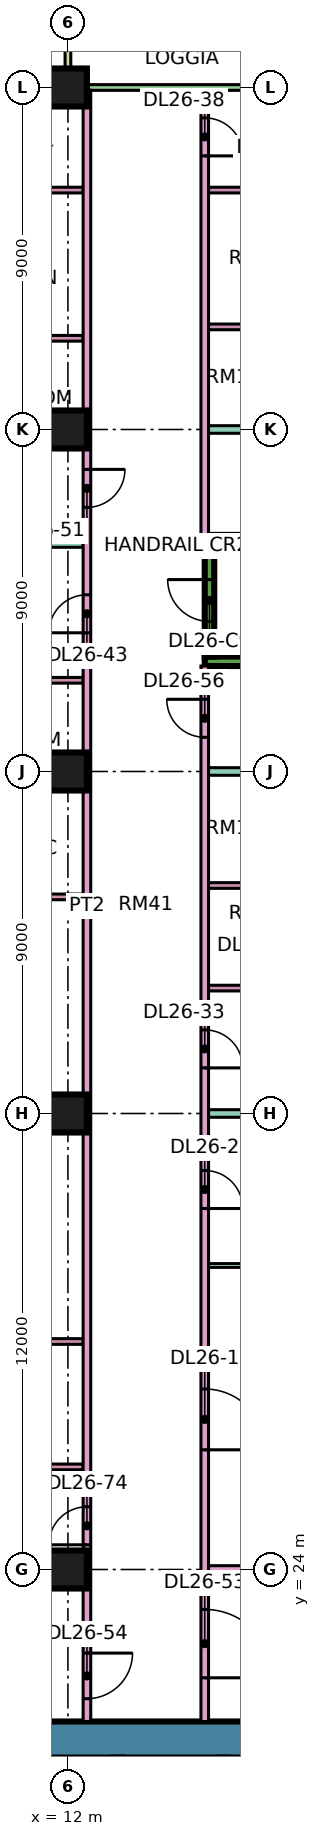
"""IFC4 building model, lengths in metres.
Left out: names, types, materials, properties, quantities, classifications, styles, units other than length and angle.
Written with IfcOpenShell. Run it as: python <this file> out.ifc"""

import sys

from ifc_helpers import new_model, si_unit, direction, frame, frame_2d, origin, origin_2d, place, context, subcontext, project, spatial, rectangle, extrude, element, fill, save


model = new_model("IFC4")
c1 = context("Model", 3, precision=1e-05, world=origin(), true_north=direction((0.0, 1.0)))
c2 = subcontext(c1, "Body", "Model", "MODEL_VIEW")
j1 = project(units=[si_unit("LENGTHUNIT", "METRE"), si_unit("PLANEANGLEUNIT", "RADIAN")], contexts=[c1])
p1 = place(None, origin())
s1 = spatial("IfcSite", under=j1, at=p1, CompositionType="ELEMENT")
p2 = place(p1, origin())
s2 = spatial("IfcBuilding", under=s1, at=p2, CompositionType="ELEMENT")
p3 = place(p2, frame((0.0, 0.0, 114.4)))
s3 = spatial("IfcBuildingStorey", under=s2, at=p3, CompositionType="ELEMENT", Elevation=114.4)
for number, where, z_axis, x_axis in (
    (1, (12.0, 24.0, 0.0), (0.0, 0.0, 1.0), (1.0, 0.0, 0.0)),
    (2, (12.0, 36.0, 0.0), (0.0, 0.0, 1.0), (1.0, 0.0, 0.0)),
    (3, (12.0, 45.0, 0.0), (0.0, 0.0, 1.0), (1.0, 0.0, 0.0)),
    (4, (12.0, 54.0, 0.0), (0.0, 0.0, 1.0), (1.0, 0.0, 0.0)),
    (5, (12.0, 63.0, 0.0), (0.0, 0.0, 1.0), (1.0, 0.0, 0.0)),
):
    element("IfcColumn", number, at=place(p3, frame(where, z_axis=z_axis, x_axis=x_axis)), inside=s3, PredefinedType="COLUMN", context=c2, shape_type="SweptSolid", body=[
        extrude(rectangle(XDim=1.0, YDim=1.0, at=origin_2d()), origin(), (0.0, 0.0, 1.0), 3.75),
    ])
p4 = place(p3, frame((9.0, 19.525, 0.0), z_axis=(0.0, 0.0, 1.0), x_axis=(1.0, 0.0, 0.0)))
e6 = element("IfcWall", 6, at=p4, inside=s3, PredefinedType="SHEAR", context=c2, shape_type="SweptSolid", body=[
    extrude(rectangle(XDim=25.0, YDim=0.95, at=frame_2d((12.5, 0.0))), origin(), (0.0, 0.0, 1.0), 3.75),
])
p5 = place(p4, frame((19.1, 0.0, 0.0)))
e7 = element("IfcOpeningElement", 7, at=p5, cuts=e6, PredefinedType="OPENING", context=c2, shape_type="SweptSolid", body=[
    extrude(rectangle(XDim=1.8, YDim=2.4, at=frame_2d((0.9, 1.2))), frame((0.0, 0.485, 0.0), z_axis=(0.0, -1.0, 0.0), x_axis=(1.0, 0.0, 0.0)), (0.0, 0.0, 1.0), 0.97),
])
for number, where, z_axis, x_axis in (
    (8, (15.6, 47.9, 0.0), (0.0, 0.0, 1.0), (1.0, 0.0, 0.0)),
    (9, (15.6, 51.1, 0.0), (0.0, 0.0, 1.0), (1.0, 0.0, 0.0)),
):
    element("IfcWall", number, at=place(p3, frame(where, z_axis=z_axis, x_axis=x_axis)), inside=s3, PredefinedType="SHEAR", context=c2, shape_type="SweptSolid", body=[
        extrude(rectangle(XDim=7.0, YDim=0.25, at=frame_2d((3.5, 0.0))), origin(), (0.0, 0.0, 1.0), 3.75),
    ])
p6 = place(p3, frame((15.725, 48.025, 0.0), z_axis=(0.0, 0.0, 1.0), x_axis=(0.0, 1.0, 0.0)))
e10 = element("IfcWall", 10, at=p6, inside=s3, PredefinedType="SHEAR", context=c2, shape_type="SweptSolid", body=[
    extrude(rectangle(XDim=2.95, YDim=0.25, at=frame_2d((1.475, 0.0))), origin(), (0.0, 0.0, 1.0), 3.75),
])
p7 = place(p6, frame((0.925, 0.0, 0.0)))
e11 = element("IfcOpeningElement", 11, at=p7, cuts=e10, PredefinedType="OPENING", context=c2, shape_type="SweptSolid", body=[
    extrude(rectangle(XDim=1.1, YDim=2.2, at=frame_2d((0.55, 1.1))), frame((0.0, 0.135, 0.0), z_axis=(0.0, -1.0, 0.0), x_axis=(1.0, 0.0, 0.0)), (0.0, 0.0, 1.0), 0.27),
])
p8 = place(p3, frame((22.425, 63.0, 0.0), z_axis=(0.0, 0.0, 1.0), x_axis=(-1.0, 0.0, 0.0)))
e12 = element("IfcWall", 12, at=p8, inside=s3, PredefinedType="SOLIDWALL", context=c2, shape_type="SweptSolid", body=[
    extrude(rectangle(XDim=10.35, YDim=0.15, at=frame_2d((5.175, 0.0))), origin(), (0.0, 0.0, 1.0), 3.35),
])
p9 = place(p8, frame((0.562, 0.0, 0.45)))
e13 = element("IfcOpeningElement", 13, at=p9, cuts=e12, PredefinedType="OPENING", context=c2, shape_type="SweptSolid", body=[
    extrude(rectangle(XDim=1.8, YDim=2.4, at=frame_2d((0.9, 1.2))), frame((0.0, 0.085, 0.0), z_axis=(0.0, -1.0, 0.0), x_axis=(1.0, 0.0, 0.0)), (0.0, 0.0, 1.0), 0.17),
])
p10 = place(p8, frame((3.975, 0.0, 0.0)))
e14 = element("IfcOpeningElement", 14, at=p10, cuts=e12, PredefinedType="OPENING", context=c2, shape_type="SweptSolid", body=[
    extrude(rectangle(XDim=1.8, YDim=2.4, at=frame_2d((0.9, 1.2))), frame((0.0, 0.085, 0.0), z_axis=(0.0, -1.0, 0.0), x_axis=(1.0, 0.0, 0.0)), (0.0, 0.0, 1.0), 0.17),
])
p11 = place(p3, frame((12.0, 64.5, 0.0), z_axis=(0.0, 0.0, 1.0), x_axis=(0.0, -1.0, 0.0)))
e15 = element("IfcWall", 15, at=p11, inside=s3, PredefinedType="SOLIDWALL", context=c2, shape_type="SweptSolid", body=[
    extrude(rectangle(XDim=1.5, YDim=0.15, at=frame_2d((0.75, 0.0))), origin(), (0.0, 0.0, 1.0), 3.35),
])
p12 = place(p3, frame((0.0, 36.0, 0.0), z_axis=(0.0, 0.0, 1.0), x_axis=(1.0, 0.0, 0.0)))
e16 = element("IfcWall", 16, at=p12, inside=s3, PredefinedType="PARTITIONING", context=c2, shape_type="SweptSolid", body=[
    extrude(rectangle(XDim=12.4, YDim=0.2, at=frame_2d((6.2, 0.0))), origin(), (0.0, 0.0, 1.0), 3.35),
])
p13 = place(p3, frame((-1.35, 51.0, 0.0), z_axis=(0.0, 0.0, 1.0), x_axis=(1.0, 0.0, 0.0)))
e17 = element("IfcWall", 17, at=p13, inside=s3, PredefinedType="PARTITIONING", context=c2, shape_type="SweptSolid", body=[
    extrude(rectangle(XDim=13.75, YDim=0.2, at=frame_2d((6.875, 0.0))), origin(), (0.0, 0.0, 1.0), 3.35),
])
p14 = place(p3, frame((0.074, 22.4, 0.0), z_axis=(0.0, 0.0, 1.0), x_axis=(1.0, 0.0, 0.0)))
e18 = element("IfcWall", 18, at=p14, inside=s3, PredefinedType="PARTITIONING", context=c2, shape_type="SweptSolid", body=[
    extrude(rectangle(XDim=12.326, YDim=0.2, at=frame_2d((6.163, 0.0))), origin(), (0.0, 0.0, 1.0), 3.35),
])
for number, where, z_axis, x_axis in (
    (19, (7.775, 26.7, 0.0), (0.0, 0.0, 1.0), (1.0, 0.0, 0.0)),
    (20, (7.775, 30.0, 0.0), (0.0, 0.0, 1.0), (1.0, 0.0, 0.0)),
    (21, (7.775, 41.7, 0.0), (0.0, 0.0, 1.0), (1.0, 0.0, 0.0)),
    (22, (7.775, 45.0, 0.0), (0.0, 0.0, 1.0), (1.0, 0.0, 0.0)),
    (23, (7.775, 47.4, 0.0), (0.0, 0.0, 1.0), (1.0, 0.0, 0.0)),
):
    element("IfcWall", number, at=place(p3, frame(where, z_axis=z_axis, x_axis=x_axis)), inside=s3, PredefinedType="PARTITIONING", context=c2, shape_type="SweptSolid", body=[
        extrude(rectangle(XDim=4.625, YDim=0.15, at=frame_2d((2.312, 0.0))), origin(), (0.0, 0.0, 1.0), 3.35),
    ])
for number, where, z_axis, x_axis in (
    (24, (8.375, 54.0, 0.0), (0.0, 0.0, 1.0), (1.0, 0.0, 0.0)),
    (25, (8.375, 56.4, 0.0), (0.0, 0.0, 1.0), (1.0, 0.0, 0.0)),
    (26, (8.375, 60.3, 0.0), (0.0, 0.0, 1.0), (1.0, 0.0, 0.0)),
):
    element("IfcWall", number, at=place(p3, frame(where, z_axis=z_axis, x_axis=x_axis)), inside=s3, PredefinedType="PARTITIONING", context=c2, shape_type="SweptSolid", body=[
        extrude(rectangle(XDim=4.025, YDim=0.15, at=frame_2d((2.012, 0.0))), origin(), (0.0, 0.0, 1.0), 3.35),
    ])
p15 = place(p3, frame((12.5, 20.0, 0.0), z_axis=(0.0, 0.0, 1.0), x_axis=(0.0, 1.0, 0.0)))
e27 = element("IfcWall", 27, at=p15, inside=s3, PredefinedType="PARTITIONING", context=c2, shape_type="SweptSolid", body=[
    extrude(rectangle(XDim=42.926, YDim=0.2, at=frame_2d((21.463, 0.0))), origin(), (0.0, 0.0, 1.0), 3.35),
])
p16 = place(p15, frame((28.65, 0.0, 0.0)))
e28 = element("IfcOpeningElement", 28, at=p16, cuts=e27, PredefinedType="OPENING", context=c2, shape_type="SweptSolid", body=[
    extrude(rectangle(XDim=1.0, YDim=2.1, at=frame_2d((0.5, 1.05))), frame((0.0, 0.11, 0.0), z_axis=(0.0, -1.0, 0.0), x_axis=(1.0, 0.0, 0.0)), (0.0, 0.0, 1.0), 0.22),
])
p17 = place(p15, frame((31.95, 0.0, 0.0)))
e29 = element("IfcOpeningElement", 29, at=p17, cuts=e27, PredefinedType="OPENING", context=c2, shape_type="SweptSolid", body=[
    extrude(rectangle(XDim=1.0, YDim=2.1, at=frame_2d((0.5, 1.05))), frame((0.0, 0.11, 0.0), z_axis=(0.0, -1.0, 0.0), x_axis=(1.0, 0.0, 0.0)), (0.0, 0.0, 1.0), 0.22),
])
p18 = place(p15, frame((0.6, 0.0, 0.0)))
e30 = element("IfcOpeningElement", 30, at=p18, cuts=e27, PredefinedType="OPENING", context=c2, shape_type="SweptSolid", body=[
    extrude(rectangle(XDim=1.2, YDim=2.1, at=frame_2d((0.6, 1.05))), frame((0.0, 0.11, 0.0), z_axis=(0.0, -1.0, 0.0), x_axis=(1.0, 0.0, 0.0)), (0.0, 0.0, 1.0), 0.22),
])
p19 = place(p15, frame((4.65, 0.0, 0.0)))
e31 = element("IfcOpeningElement", 31, at=p19, cuts=e27, PredefinedType="OPENING", context=c2, shape_type="SweptSolid", body=[
    extrude(rectangle(XDim=1.0, YDim=2.1, at=frame_2d((0.5, 1.05))), frame((0.0, 0.11, 0.0), z_axis=(0.0, -1.0, 0.0), x_axis=(1.0, 0.0, 0.0)), (0.0, 0.0, 1.0), 0.22),
])
p20 = place(p3, frame((15.6, 20.0, 0.0), z_axis=(0.0, 0.0, 1.0), x_axis=(0.0, 1.0, 0.0)))
e32 = element("IfcWall", 32, at=p20, inside=s3, PredefinedType="PARTITIONING", context=c2, shape_type="SweptSolid", body=[
    extrude(rectangle(XDim=27.775, YDim=0.2, at=frame_2d((13.887, 0.0))), origin(), (0.0, 0.0, 1.0), 3.35),
])
p21 = place(p20, frame((7.15, 0.0, 0.0)))
e33 = element("IfcOpeningElement", 33, at=p21, cuts=e32, PredefinedType="OPENING", context=c2, shape_type="SweptSolid", body=[
    extrude(rectangle(XDim=1.6, YDim=2.1, at=frame_2d((0.8, 1.05))), frame((0.0, 0.11, 0.0), z_axis=(0.0, -1.0, 0.0), x_axis=(1.0, 0.0, 0.0)), (0.0, 0.0, 1.0), 0.22),
])
p22 = place(p20, frame((13.5, 0.0, 0.0)))
e34 = element("IfcOpeningElement", 34, at=p22, cuts=e32, PredefinedType="OPENING", context=c2, shape_type="SweptSolid", body=[
    extrude(rectangle(XDim=1.0, YDim=2.1, at=frame_2d((0.5, 1.05))), frame((0.0, 0.11, 0.0), z_axis=(0.0, -1.0, 0.0), x_axis=(1.0, 0.0, 0.0)), (0.0, 0.0, 1.0), 0.22),
])
p23 = place(p20, frame((17.2, 0.0, 0.0)))
e35 = element("IfcOpeningElement", 35, at=p23, cuts=e32, PredefinedType="OPENING", context=c2, shape_type="SweptSolid", body=[
    extrude(rectangle(XDim=1.0, YDim=2.1, at=frame_2d((0.5, 1.05))), frame((0.0, 0.11, 0.0), z_axis=(0.0, -1.0, 0.0), x_axis=(1.0, 0.0, 0.0)), (0.0, 0.0, 1.0), 0.22),
])
p24 = place(p20, frame((1.15, 0.0, 0.0)))
e36 = element("IfcOpeningElement", 36, at=p24, cuts=e32, PredefinedType="OPENING", context=c2, shape_type="SweptSolid", body=[
    extrude(rectangle(XDim=1.8, YDim=2.1, at=frame_2d((0.9, 1.05))), frame((0.0, 0.11, 0.0), z_axis=(0.0, -1.0, 0.0), x_axis=(1.0, 0.0, 0.0)), (0.0, 0.0, 1.0), 0.22),
])
p25 = place(p20, frame((25.9, 0.0, 0.0)))
e37 = element("IfcOpeningElement", 37, at=p25, cuts=e32, PredefinedType="OPENING", context=c2, shape_type="SweptSolid", body=[
    extrude(rectangle(XDim=1.0, YDim=2.1, at=frame_2d((0.5, 1.05))), frame((0.0, 0.11, 0.0), z_axis=(0.0, -1.0, 0.0), x_axis=(1.0, 0.0, 0.0)), (0.0, 0.0, 1.0), 0.22),
])
p26 = place(p3, frame((15.6, 51.225, 0.0), z_axis=(0.0, 0.0, 1.0), x_axis=(0.0, 1.0, 0.0)))
e38 = element("IfcWall", 38, at=p26, inside=s3, PredefinedType="PARTITIONING", context=c2, shape_type="SweptSolid", body=[
    extrude(rectangle(XDim=11.701, YDim=0.2, at=frame_2d((5.851, 0.0))), origin(), (0.0, 0.0, 1.0), 3.35),
])
p27 = place(p26, frame((9.975, 0.0, 0.0)))
e39 = element("IfcOpeningElement", 39, at=p27, cuts=e38, PredefinedType="OPENING", context=c2, shape_type="SweptSolid", body=[
    extrude(rectangle(XDim=1.0, YDim=2.1, at=frame_2d((0.5, 1.05))), frame((0.0, 0.11, 0.0), z_axis=(0.0, -1.0, 0.0), x_axis=(1.0, 0.0, 0.0)), (0.0, 0.0, 1.0), 0.22),
])
p28 = place(p3, frame((15.7, 24.0, 0.0), z_axis=(0.0, 0.0, 1.0), x_axis=(1.0, 0.0, 0.0)))
e40 = element("IfcWall", 40, at=p28, inside=s3, PredefinedType="PARTITIONING", context=c2, shape_type="SweptSolid", body=[
    extrude(rectangle(XDim=5.8, YDim=0.2, at=frame_2d((2.9, 0.0))), origin(), (0.0, 0.0, 1.0), 3.35),
])
p29 = place(p3, frame((15.7, 32.0, 0.0), z_axis=(0.0, 0.0, 1.0), x_axis=(1.0, 0.0, 0.0)))
e41 = element("IfcWall", 41, at=p29, inside=s3, PredefinedType="PARTITIONING", context=c2, shape_type="SweptSolid", body=[
    extrude(rectangle(XDim=5.8, YDim=0.1, at=frame_2d((2.9, 0.0))), origin(), (0.0, 0.0, 1.0), 3.35),
])
p30 = place(p3, frame((15.7, 36.0, 0.0), z_axis=(0.0, 0.0, 1.0), x_axis=(1.0, 0.0, 0.0)))
e42 = element("IfcWall", 42, at=p30, inside=s3, PredefinedType="PARTITIONING", context=c2, shape_type="SweptSolid", body=[
    extrude(rectangle(XDim=8.3, YDim=0.2, at=frame_2d((4.15, 0.0))), origin(), (0.0, 0.0, 1.0), 3.35),
])
p31 = place(p3, frame((15.7, 39.3, 0.0), z_axis=(0.0, 0.0, 1.0), x_axis=(1.0, 0.0, 0.0)))
e43 = element("IfcWall", 43, at=p31, inside=s3, PredefinedType="PARTITIONING", context=c2, shape_type="SweptSolid", body=[
    extrude(rectangle(XDim=2.525, YDim=0.15, at=frame_2d((1.263, 0.0))), origin(), (0.0, 0.0, 1.0), 3.35),
])
p32 = place(p31, frame((0.9, 0.0, 0.0)))
e44 = element("IfcOpeningElement", 44, at=p32, cuts=e43, PredefinedType="OPENING", context=c2, shape_type="SweptSolid", body=[
    extrude(rectangle(XDim=0.8, YDim=2.1, at=frame_2d((0.4, 1.05))), frame((0.0, 0.085, 0.0), z_axis=(0.0, -1.0, 0.0), x_axis=(1.0, 0.0, 0.0)), (0.0, 0.0, 1.0), 0.17),
])
p33 = place(p3, frame((15.7, 42.0, 0.0), z_axis=(0.0, 0.0, 1.0), x_axis=(1.0, 0.0, 0.0)))
e45 = element("IfcWall", 45, at=p33, inside=s3, PredefinedType="PARTITIONING", context=c2, shape_type="SweptSolid", body=[
    extrude(rectangle(XDim=2.525, YDim=0.15, at=frame_2d((1.263, 0.0))), origin(), (0.0, 0.0, 1.0), 3.35),
])
p34 = place(p3, frame((15.7, 45.0, 0.0), z_axis=(0.0, 0.0, 1.0), x_axis=(1.0, 0.0, 0.0)))
e46 = element("IfcWall", 46, at=p34, inside=s3, PredefinedType="PARTITIONING", context=c2, shape_type="SweptSolid", body=[
    extrude(rectangle(XDim=8.226, YDim=0.2, at=frame_2d((4.113, 0.0))), origin(), (0.0, 0.0, 1.0), 3.35),
])
p35 = place(p3, frame((15.7, 54.0, 0.0), z_axis=(0.0, 0.0, 1.0), x_axis=(1.0, 0.0, 0.0)))
e47 = element("IfcWall", 47, at=p35, inside=s3, PredefinedType="PARTITIONING", context=c2, shape_type="SweptSolid", body=[
    extrude(rectangle(XDim=8.3, YDim=0.2, at=frame_2d((4.15, 0.0))), origin(), (0.0, 0.0, 1.0), 3.35),
])
for number, where, z_axis, x_axis in (
    (48, (15.7, 56.7, 0.0), (0.0, 0.0, 1.0), (1.0, 0.0, 0.0)),
    (49, (15.7, 60.3, 0.0), (0.0, 0.0, 1.0), (1.0, 0.0, 0.0)),
):
    element("IfcWall", number, at=place(p3, frame(where, z_axis=z_axis, x_axis=x_axis)), inside=s3, PredefinedType="PARTITIONING", context=c2, shape_type="SweptSolid", body=[
        extrude(rectangle(XDim=2.525, YDim=0.15, at=frame_2d((1.263, 0.0))), origin(), (0.0, 0.0, 1.0), 3.35),
    ])
p36 = place(p7, frame((1.1, 0.0, 0.0), z_axis=(0.0, 0.0, 1.0), x_axis=(-1.0, 0.0, 0.0)))
e50 = element("IfcDoor", 50, at=p36, inside=s3, OperationType="SINGLE_SWING_RIGHT", PredefinedType="DOOR", context=c2, shape_type="SweptSolid", body=[
    extrude(rectangle(XDim=1.1, YDim=2.2, at=frame_2d((0.55, 1.1))), frame((0.0, 0.025, 0.0), z_axis=(0.0, -1.0, 0.0), x_axis=(1.0, 0.0, 0.0)), (0.0, 0.0, 1.0), 0.05),
])
fill(e11, e50)
p37 = place(p21, frame((1.6, 0.0, 0.0), z_axis=(0.0, 0.0, 1.0), x_axis=(-1.0, 0.0, 0.0)))
e51 = element("IfcDoor", 51, at=p37, inside=s3, OperationType="DOUBLE_DOOR_SINGLE_SWING", PredefinedType="DOOR", context=c2, shape_type="SweptSolid", body=[
    extrude(rectangle(XDim=1.6, YDim=2.1, at=frame_2d((0.8, 1.05))), frame((0.0, 0.025, 0.0), z_axis=(0.0, -1.0, 0.0), x_axis=(1.0, 0.0, 0.0)), (0.0, 0.0, 1.0), 0.05),
])
fill(e33, e51)
p38 = place(p22, frame((1.0, 0.0, 0.0), z_axis=(0.0, 0.0, 1.0), x_axis=(-1.0, 0.0, 0.0)))
e52 = element("IfcDoor", 52, at=p38, inside=s3, OperationType="SINGLE_SWING_LEFT", PredefinedType="DOOR", context=c2, shape_type="SweptSolid", body=[
    extrude(rectangle(XDim=1.0, YDim=2.1, at=frame_2d((0.5, 1.05))), frame((0.0, 0.025, 0.0), z_axis=(0.0, -1.0, 0.0), x_axis=(1.0, 0.0, 0.0)), (0.0, 0.0, 1.0), 0.05),
])
fill(e34, e52)
p39 = place(p23, frame((1.0, 0.0, 0.0), z_axis=(0.0, 0.0, 1.0), x_axis=(-1.0, 0.0, 0.0)))
e53 = element("IfcDoor", 53, at=p39, inside=s3, OperationType="SINGLE_SWING_LEFT", PredefinedType="DOOR", context=c2, shape_type="SweptSolid", body=[
    extrude(rectangle(XDim=1.0, YDim=2.1, at=frame_2d((0.5, 1.05))), frame((0.0, 0.025, 0.0), z_axis=(0.0, -1.0, 0.0), x_axis=(1.0, 0.0, 0.0)), (0.0, 0.0, 1.0), 0.05),
])
fill(e35, e53)
p40 = place(p27, frame((1.0, 0.0, 0.0), z_axis=(0.0, 0.0, 1.0), x_axis=(-1.0, 0.0, 0.0)))
e54 = element("IfcDoor", 54, at=p40, inside=s3, OperationType="SINGLE_SWING_LEFT", PredefinedType="DOOR", context=c2, shape_type="SweptSolid", body=[
    extrude(rectangle(XDim=1.0, YDim=2.1, at=frame_2d((0.5, 1.05))), frame((0.0, 0.025, 0.0), z_axis=(0.0, -1.0, 0.0), x_axis=(1.0, 0.0, 0.0)), (0.0, 0.0, 1.0), 0.05),
])
fill(e39, e54)
p41 = place(p16, origin())
e55 = element("IfcDoor", 55, at=p41, inside=s3, OperationType="SINGLE_SWING_LEFT", PredefinedType="DOOR", context=c2, shape_type="SweptSolid", body=[
    extrude(rectangle(XDim=1.0, YDim=2.1, at=frame_2d((0.5, 1.05))), frame((0.0, 0.025, 0.0), z_axis=(0.0, -1.0, 0.0), x_axis=(1.0, 0.0, 0.0)), (0.0, 0.0, 1.0), 0.05),
])
fill(e28, e55)
p42 = place(p17, origin())
e56 = element("IfcDoor", 56, at=p42, inside=s3, OperationType="SINGLE_SWING_RIGHT", PredefinedType="DOOR", context=c2, shape_type="SweptSolid", body=[
    extrude(rectangle(XDim=1.0, YDim=2.1, at=frame_2d((0.5, 1.05))), frame((0.0, 0.025, 0.0), z_axis=(0.0, -1.0, 0.0), x_axis=(1.0, 0.0, 0.0)), (0.0, 0.0, 1.0), 0.05),
])
fill(e29, e56)
p43 = place(p24, frame((1.8, 0.0, 0.0), z_axis=(0.0, 0.0, 1.0), x_axis=(-1.0, 0.0, 0.0)))
e57 = element("IfcDoor", 57, at=p43, inside=s3, OperationType="DOUBLE_DOOR_SINGLE_SWING", PredefinedType="DOOR", context=c2, shape_type="SweptSolid", body=[
    extrude(rectangle(XDim=1.8, YDim=2.1, at=frame_2d((0.9, 1.05))), frame((0.0, 0.025, 0.0), z_axis=(0.0, -1.0, 0.0), x_axis=(1.0, 0.0, 0.0)), (0.0, 0.0, 1.0), 0.05),
])
fill(e36, e57)
p44 = place(p18, origin())
e58 = element("IfcDoor", 58, at=p44, inside=s3, OperationType="SINGLE_SWING_RIGHT", PredefinedType="DOOR", context=c2, shape_type="SweptSolid", body=[
    extrude(rectangle(XDim=1.2, YDim=2.1, at=frame_2d((0.6, 1.05))), frame((0.0, 0.025, 0.0), z_axis=(0.0, -1.0, 0.0), x_axis=(1.0, 0.0, 0.0)), (0.0, 0.0, 1.0), 0.05),
])
fill(e30, e58)
p45 = place(p25, frame((1.0, 0.0, 0.0), z_axis=(0.0, 0.0, 1.0), x_axis=(-1.0, 0.0, 0.0)))
e59 = element("IfcDoor", 59, at=p45, inside=s3, OperationType="SINGLE_SWING_RIGHT", PredefinedType="DOOR", context=c2, shape_type="SweptSolid", body=[
    extrude(rectangle(XDim=1.0, YDim=2.1, at=frame_2d((0.5, 1.05))), frame((0.0, 0.025, 0.0), z_axis=(0.0, -1.0, 0.0), x_axis=(1.0, 0.0, 0.0)), (0.0, 0.0, 1.0), 0.05),
])
fill(e37, e59)
p46 = place(p19, origin())
e60 = element("IfcDoor", 60, at=p46, inside=s3, OperationType="SINGLE_SWING_LEFT", PredefinedType="DOOR", context=c2, shape_type="SweptSolid", body=[
    extrude(rectangle(XDim=1.0, YDim=2.1, at=frame_2d((0.5, 1.05))), frame((0.0, 0.025, 0.0), z_axis=(0.0, -1.0, 0.0), x_axis=(1.0, 0.0, 0.0)), (0.0, 0.0, 1.0), 0.05),
])
fill(e31, e60)
save(model, sys.argv[1])
